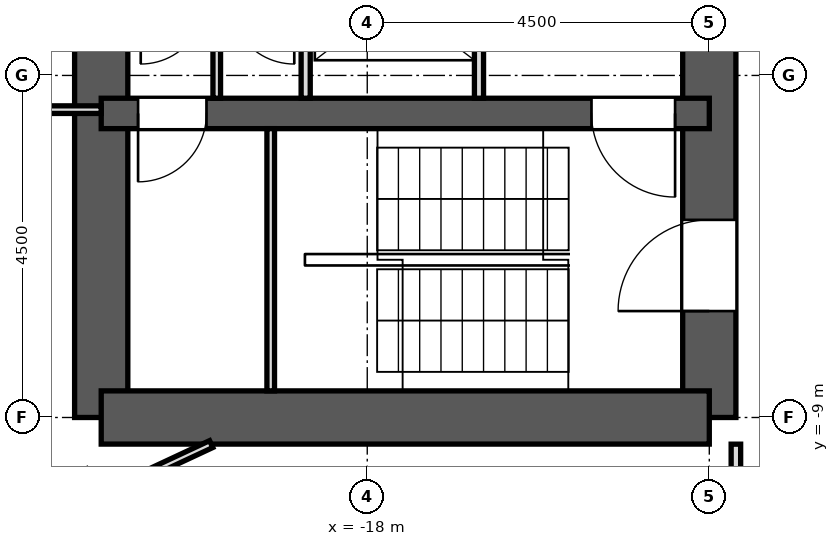
"""IFC4 building model, lengths in metres.
Left out: names, types, materials, properties, quantities, classifications, styles, units other than length and angle.
Written with IfcOpenShell. Run it as: python <this file> out.ifc"""

import sys

from ifc_helpers import new_model, si_unit, direction, frame, frame_2d, origin, place, context, subcontext, project, spatial, rectangle, extrude, element, fill, save


model = new_model("IFC4")
c1 = context("Model", 3, precision=1e-05, world=origin(), true_north=direction((0.0, 1.0)))
c2 = subcontext(c1, "Body", "Model", "MODEL_VIEW")
j1 = project(units=[si_unit("LENGTHUNIT", "METRE"), si_unit("PLANEANGLEUNIT", "RADIAN")], contexts=[c1])
p1 = place(None, origin())
s1 = spatial("IfcSite", under=j1, at=p1, CompositionType="ELEMENT")
p2 = place(p1, origin())
s2 = spatial("IfcBuilding", under=s1, at=p2, CompositionType="ELEMENT")
p3 = place(p2, frame((0.0, 0.0, 210.3)))
s3 = spatial("IfcBuildingStorey", under=s2, at=p3, CompositionType="ELEMENT", Elevation=210.3)
p4 = place(p3, frame((-13.5, -9.0, 0.0), z_axis=(0.0, 0.0, 1.0), x_axis=(0.0, 1.0, 0.0)))
e1 = element("IfcWall", 1, at=p4, inside=s3, PredefinedType="SHEAR", context=c2, shape_type="SweptSolid", body=[
    extrude(rectangle(XDim=18.0, YDim=0.7, at=frame_2d((9.0, 0.0))), origin(), (0.0, 0.0, 1.0), 3.3),
])
p5 = place(p4, frame((15.4, 0.0, 0.0)))
e2 = element("IfcOpeningElement", 2, at=p5, cuts=e1, PredefinedType="OPENING", context=c2, shape_type="SweptSolid", body=[
    extrude(rectangle(XDim=1.2, YDim=2.1, at=frame_2d((0.6, 1.05))), frame((0.0, 0.362, 0.0), z_axis=(0.0, -1.0, 0.0), x_axis=(1.0, 0.0, 0.0)), (0.0, 0.0, 1.0), 0.724),
])
p6 = place(p4, frame((1.4, 0.0, 0.0)))
e3 = element("IfcOpeningElement", 3, at=p6, cuts=e1, PredefinedType="OPENING", context=c2, shape_type="SweptSolid", body=[
    extrude(rectangle(XDim=1.2, YDim=2.1, at=frame_2d((0.6, 1.05))), frame((0.0, 0.362, 0.0), z_axis=(0.0, -1.0, 0.0), x_axis=(1.0, 0.0, 0.0)), (0.0, 0.0, 1.0), 0.724),
])
p7 = place(p4, frame((7.5, 0.0, 0.0)))
e4 = element("IfcOpeningElement", 4, at=p7, cuts=e1, PredefinedType="OPENING", context=c2, shape_type="SweptSolid", body=[
    extrude(rectangle(XDim=3.0, YDim=2.4, at=frame_2d((1.5, 1.2))), frame((0.0, 0.362, 0.0), z_axis=(0.0, -1.0, 0.0), x_axis=(1.0, 0.0, 0.0)), (0.0, 0.0, 1.0), 0.724),
])
p8 = place(p3, frame((-21.5, -9.0, 0.0), z_axis=(0.0, 0.0, 1.0), x_axis=(0.0, 1.0, 0.0)))
e5 = element("IfcWall", 5, at=p8, inside=s3, PredefinedType="SHEAR", context=c2, shape_type="SweptSolid", body=[
    extrude(rectangle(XDim=18.0, YDim=0.7, at=frame_2d((9.0, 0.0))), origin(), (0.0, 0.0, 1.0), 3.3),
])
p9 = place(p8, frame((9.45, 0.0, 0.0)))
e6 = element("IfcOpeningElement", 6, at=p9, cuts=e5, PredefinedType="OPENING", context=c2, shape_type="SweptSolid", body=[
    extrude(rectangle(XDim=0.9, YDim=2.1, at=frame_2d((0.45, 1.05))), frame((0.0, 0.362, 0.0), z_axis=(0.0, -1.0, 0.0), x_axis=(1.0, 0.0, 0.0)), (0.0, 0.0, 1.0), 0.724),
])
p10 = place(p8, frame((7.65, 0.0, 0.0)))
e7 = element("IfcOpeningElement", 7, at=p10, cuts=e5, PredefinedType="OPENING", context=c2, shape_type="SweptSolid", body=[
    extrude(rectangle(XDim=0.9, YDim=2.1, at=frame_2d((0.45, 1.05))), frame((0.0, 0.362, 0.0), z_axis=(0.0, -1.0, 0.0), x_axis=(1.0, 0.0, 0.0)), (0.0, 0.0, 1.0), 0.724),
])
p11 = place(p3, frame((-13.5, -9.0, 0.0), z_axis=(0.0, 0.0, 1.0), x_axis=(-1.0, 0.0, 0.0)))
e8 = element("IfcWall", 8, at=p11, inside=s3, PredefinedType="SHEAR", context=c2, shape_type="SweptSolid", body=[
    extrude(rectangle(XDim=8.0, YDim=0.7, at=frame_2d((4.0, 0.0))), origin(), (0.0, 0.0, 1.0), 3.3),
])
p12 = place(p3, frame((-13.5, -5.0, 0.0), z_axis=(0.0, 0.0, 1.0), x_axis=(-1.0, 0.0, 0.0)))
e9 = element("IfcWall", 9, at=p12, inside=s3, PredefinedType="SHEAR", context=c2, shape_type="SweptSolid", body=[
    extrude(rectangle(XDim=8.0, YDim=0.4, at=frame_2d((4.0, 0.0))), origin(), (0.0, 0.0, 1.0), 3.3),
])
p13 = place(p12, frame((6.615, 0.0, 0.0)))
e10 = element("IfcOpeningElement", 10, at=p13, cuts=e9, PredefinedType="OPENING", context=c2, shape_type="SweptSolid", body=[
    extrude(rectangle(XDim=0.9, YDim=2.1, at=frame_2d((0.45, 1.05))), frame((0.0, 0.212, 0.0), z_axis=(0.0, -1.0, 0.0), x_axis=(1.0, 0.0, 0.0)), (0.0, 0.0, 1.0), 0.424),
])
p14 = place(p12, frame((0.45, 0.0, 0.0)))
e11 = element("IfcOpeningElement", 11, at=p14, cuts=e9, PredefinedType="OPENING", context=c2, shape_type="SweptSolid", body=[
    extrude(rectangle(XDim=1.1, YDim=2.1, at=frame_2d((0.55, 1.05))), frame((0.0, 0.212, 0.0), z_axis=(0.0, -1.0, 0.0), x_axis=(1.0, 0.0, 0.0)), (0.0, 0.0, 1.0), 0.424),
])
p15 = place(p3, frame((-21.516, -10.033, 0.0), z_axis=(0.0, 0.0, 1.0), x_axis=(0.906055596822, 0.423158664648, 0.0)))
e12 = element("IfcWall", 12, at=p15, inside=s3, PredefinedType="PARTITIONING", context=c2, shape_type="SweptSolid", body=[
    extrude(rectangle(XDim=1.614, YDim=0.1, at=frame_2d((0.807, 0.0))), origin(), (0.0, 0.0, 1.0), 2.85),
])
p16 = place(p3, frame((-13.15, -11.567, 0.0), z_axis=(0.0, 0.0, 1.0), x_axis=(0.0, 1.0, 0.0)))
e13 = element("IfcWall", 13, at=p16, inside=s3, PredefinedType="PARTITIONING", context=c2, shape_type="SweptSolid", body=[
    extrude(rectangle(XDim=2.216, YDim=0.125, at=frame_2d((1.108, 0.0))), origin(), (0.0, 0.0, 1.0), 2.85),
])
p17 = place(p3, frame((-21.5, -4.95, 0.0), z_axis=(0.0, 0.0, 1.0), x_axis=(-1.0, 0.0, 0.0)))
e14 = element("IfcWall", 14, at=p17, inside=s3, PredefinedType="PARTITIONING", context=c2, shape_type="SweptSolid", body=[
    extrude(rectangle(XDim=2.307, YDim=0.1, at=frame_2d((1.153, 0.0))), origin(), (0.0, 0.0, 1.0), 2.85),
])
p18 = place(p3, frame((-16.53, -4.8, 0.0), z_axis=(0.0, 0.0, 1.0), x_axis=(0.0, 1.0, 0.0)))
e15 = element("IfcWall", 15, at=p18, inside=s3, PredefinedType="PARTITIONING", context=c2, shape_type="SweptSolid", body=[
    extrude(rectangle(XDim=2.6, YDim=0.12, at=frame_2d((1.3, 0.0))), origin(), (0.0, 0.0, 1.0), 2.85),
])
p19 = place(p18, frame((0.75, 0.0, 0.0)))
e16 = element("IfcOpeningElement", 16, at=p19, cuts=e15, PredefinedType="OPENING", context=c2, shape_type="SweptSolid", body=[
    extrude(rectangle(XDim=1.1, YDim=2.1, at=frame_2d((0.55, 1.05))), frame((0.0, 0.072, 0.0), z_axis=(0.0, -1.0, 0.0), x_axis=(1.0, 0.0, 0.0)), (0.0, 0.0, 1.0), 0.144),
])
p20 = place(p3, frame((-18.81, -4.8, 0.0), z_axis=(0.0, 0.0, 1.0), x_axis=(0.0, 1.0, 0.0)))
e17 = element("IfcWall", 17, at=p20, inside=s3, PredefinedType="PARTITIONING", context=c2, shape_type="SweptSolid", body=[
    extrude(rectangle(XDim=2.6, YDim=0.12, at=frame_2d((1.3, 0.0))), origin(), (0.0, 0.0, 1.0), 2.85),
])
p21 = place(p3, frame((-19.98, -4.8, 0.0), z_axis=(0.0, 0.0, 1.0), x_axis=(0.0, 1.0, 0.0)))
e18 = element("IfcWall", 18, at=p21, inside=s3, PredefinedType="PARTITIONING", context=c2, shape_type="SweptSolid", body=[
    extrude(rectangle(XDim=2.6, YDim=0.1, at=frame_2d((1.3, 0.0))), origin(), (0.0, 0.0, 1.0), 2.85),
])
p22 = place(p3, frame((-19.27, -8.65, 0.0), z_axis=(0.0, 0.0, 1.0), x_axis=(0.0, 1.0, 0.0)))
e19 = element("IfcWall", 19, at=p22, inside=s3, PredefinedType="PARTITIONING", context=c2, shape_type="SweptSolid", body=[
    extrude(rectangle(XDim=3.45, YDim=0.1, at=frame_2d((1.725, 0.0))), origin(), (0.0, 0.0, 1.0), 2.85),
])
p23 = place(p13, origin())
e20 = element("IfcDoor", 20, at=p23, inside=s3, OperationType="SINGLE_SWING_RIGHT", PredefinedType="DOOR", context=c2, shape_type="SweptSolid", body=[
    extrude(rectangle(XDim=0.9, YDim=2.1, at=frame_2d((0.45, 1.05))), frame((0.0, 0.025, 0.0), z_axis=(0.0, -1.0, 0.0), x_axis=(1.0, 0.0, 0.0)), (0.0, 0.0, 1.0), 0.05),
])
fill(e10, e20)
p24 = place(p14, origin())
e21 = element("IfcDoor", 21, at=p24, inside=s3, OperationType="SINGLE_SWING_LEFT", PredefinedType="DOOR", context=c2, shape_type="SweptSolid", body=[
    extrude(rectangle(XDim=1.1, YDim=2.1, at=frame_2d((0.55, 1.05))), frame((0.0, 0.025, 0.0), z_axis=(0.0, -1.0, 0.0), x_axis=(1.0, 0.0, 0.0)), (0.0, 0.0, 1.0), 0.05),
])
fill(e11, e21)
p25 = place(p6, origin())
e22 = element("IfcDoor", 22, at=p25, inside=s3, OperationType="SINGLE_SWING_LEFT", PredefinedType="DOOR", context=c2, shape_type="SweptSolid", body=[
    extrude(rectangle(XDim=1.2, YDim=2.1, at=frame_2d((0.6, 1.05))), frame((0.0, 0.025, 0.0), z_axis=(0.0, -1.0, 0.0), x_axis=(1.0, 0.0, 0.0)), (0.0, 0.0, 1.0), 0.05),
])
fill(e3, e22)
save(model, sys.argv[1])
